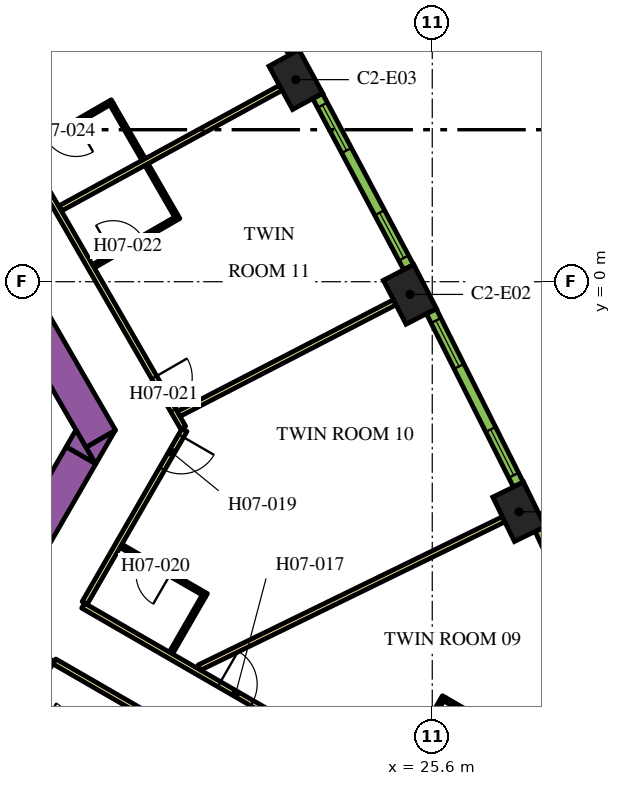
"""IFC4 building model, lengths in metres.
Left out: names, types, materials, properties, quantities, classifications, styles, units other than length and angle.
Written with IfcOpenShell. Run it as: python <this file> out.ifc"""

import sys

from ifc_helpers import new_model, si_unit, direction, frame, frame_2d, origin, origin_2d, place, context, subcontext, project, spatial, polyline, rectangle, outline, extrude, element, fill, save


model = new_model("IFC4")
c1 = context("Model", 3, precision=1e-05, world=origin(), true_north=direction((0.0, 1.0)))
c2 = subcontext(c1, "Body", "Model", "MODEL_VIEW")
j1 = project(units=[si_unit("LENGTHUNIT", "METRE"), si_unit("PLANEANGLEUNIT", "RADIAN")], contexts=[c1])
p1 = place(None, origin())
s1 = spatial("IfcSite", under=j1, at=p1, CompositionType="ELEMENT")
p2 = place(p1, origin())
s2 = spatial("IfcBuilding", under=s1, at=p2, CompositionType="ELEMENT")
p3 = place(p2, frame((0.0, 0.0, 95.4)))
s3 = spatial("IfcBuildingStorey", under=s2, at=p3, CompositionType="ELEMENT", Elevation=95.4)
for number, where, z_axis, x_axis in (
    (1, (27.883, -6.054, 0.0), (0.0, 0.0, 1.0), (-0.438, 0.899, 0.0)),
    (2, (25.012, -0.334, 0.0), (0.0, 0.0, 1.0), (-0.459, 0.888, 0.0)),
    (3, (22.009, 5.317, 0.0), (0.0, 0.0, 1.0), (-0.48, 0.877, 0.0)),
):
    element("IfcColumn", number, at=place(p3, frame(where, z_axis=z_axis, x_axis=x_axis)), inside=s3, PredefinedType="COLUMN", context=c2, shape_type="SweptSolid", body=[
        extrude(rectangle(XDim=1.3, YDim=0.9, at=origin_2d()), origin(), (0.0, 0.0, 1.0), 3.9),
    ])
p4 = place(p3, frame((6.776, 13.364, 0.0), z_axis=(0.0, 0.0, 1.0), x_axis=(0.500004177138, -0.8660229921, 0.0)))
e4 = element("IfcWall", 4, at=p4, inside=s3, PredefinedType="SOLIDWALL", context=c2, shape_type="SweptSolid", body=[
    extrude(rectangle(XDim=20.204, YDim=0.9, at=frame_2d((10.102, 0.0))), origin(), (0.0, 0.0, 1.0), 3.9),
])
p5 = place(p3, origin())
e5 = element("IfcWall", 5, at=p5, inside=s3, PredefinedType="SOLIDWALL", context=c2, shape_type="SweptSolid", body=[
    extrude(outline(polyline([(16.743, -4.8), (16.489, -4.36), (17.251, -3.92), (16.743, -4.8)])), origin(), (0.0, 0.0, 1.0), 3.9),
])
p6 = place(p3, frame((11.695, -12.644, 0.0), z_axis=(0.0, 0.0, 1.0), x_axis=(0.500010229568, 0.86601949766, 0.0)))
e6 = element("IfcWall", 6, at=p6, inside=s3, PredefinedType="SOLIDWALL", context=c2, shape_type="SweptSolid", body=[
    extrude(rectangle(XDim=9.326, YDim=0.9, at=frame_2d((4.663, 0.0))), origin(), (0.0, 0.0, 1.0), 3.9),
])
e7 = element("IfcWall", 7, at=p5, inside=s3, PredefinedType="SOLIDWALL", context=c2, shape_type="SweptSolid", body=[
    extrude(outline(polyline([(16.223, -3.9), (16.732, -4.78), (15.969, -4.34), (16.223, -3.9)])), origin(), (0.0, 0.0, 1.0), 3.9),
])
p7 = place(p3, frame((16.412, -8.523, 0.0), z_axis=(0.0, 0.0, 1.0), x_axis=(0.866025629663, -0.499999608766, 0.0)))
e8 = element("IfcWall", 8, at=p7, inside=s3, PredefinedType="PARTITIONING", context=c2, shape_type="SweptSolid", body=[
    extrude(rectangle(XDim=13.624, YDim=0.15, at=frame_2d((6.812, 0.0))), origin(), (0.0, 0.0, 1.0), 2.75),
])
p8 = place(p7, frame((4.134, 0.0, 0.0)))
e9 = element("IfcOpeningElement", 9, at=p8, cuts=e8, PredefinedType="OPENING", context=c2, shape_type="SweptSolid", body=[
    extrude(rectangle(XDim=1.0, YDim=2.1, at=frame_2d((0.5, 1.05))), frame((0.0, 0.085, 0.0), z_axis=(0.0, -1.0, 0.0), x_axis=(1.0, 0.0, 0.0)), (0.0, 0.0, 1.0), 0.17),
])
p9 = place(p3, frame((19.081, -3.9, 0.0), z_axis=(0.0, 0.0, 1.0), x_axis=(-0.499974327079, -0.866040225545, 0.0)))
e10 = element("IfcWall", 10, at=p9, inside=s3, PredefinedType="PARTITIONING", context=c2, shape_type="SweptSolid", body=[
    extrude(rectangle(XDim=5.258, YDim=0.15, at=frame_2d((2.629, 0.0))), origin(), (0.0, 0.0, 1.0), 2.75),
])
p10 = place(p9, frame((0.18, 0.0, 0.0)))
e11 = element("IfcOpeningElement", 11, at=p10, cuts=e10, PredefinedType="OPENING", context=c2, shape_type="SweptSolid", body=[
    extrude(rectangle(XDim=1.0, YDim=2.1, at=frame_2d((0.5, 1.05))), frame((0.0, 0.085, 0.0), z_axis=(0.0, -1.0, 0.0), x_axis=(1.0, 0.0, 0.0)), (0.0, 0.0, 1.0), 0.17),
])
p11 = place(p3, frame((6.163, 18.475, 0.0), z_axis=(0.0, 0.0, 1.0), x_axis=(0.500001317485, -0.866024643133, 0.0)))
e12 = element("IfcWall", 12, at=p11, inside=s3, PredefinedType="PARTITIONING", context=c2, shape_type="SweptSolid", body=[
    extrude(rectangle(XDim=25.767, YDim=0.15, at=frame_2d((12.883, 0.0))), origin(), (0.0, 0.0, 1.0), 2.75),
])
p12 = place(p11, frame((24.241, 0.0, 0.0)))
e13 = element("IfcOpeningElement", 13, at=p12, cuts=e12, PredefinedType="OPENING", context=c2, shape_type="SweptSolid", body=[
    extrude(rectangle(XDim=1.0, YDim=2.1, at=frame_2d((0.5, 1.05))), frame((0.0, 0.085, 0.0), z_axis=(0.0, -1.0, 0.0), x_axis=(1.0, 0.0, 0.0)), (0.0, 0.0, 1.0), 0.17),
])
p13 = place(p11, frame((13.144, 0.0, 0.0)))
e14 = element("IfcOpeningElement", 14, at=p13, cuts=e12, PredefinedType="OPENING", context=c2, shape_type="SweptSolid", body=[
    extrude(rectangle(XDim=1.0, YDim=2.1, at=frame_2d((0.5, 1.05))), frame((0.0, 0.085, 0.0), z_axis=(0.0, -1.0, 0.0), x_axis=(1.0, 0.0, 0.0)), (0.0, 0.0, 1.0), 0.17),
])
p14 = place(p11, frame((11.592, 0.0, 0.0)))
e15 = element("IfcOpeningElement", 15, at=p14, cuts=e12, PredefinedType="OPENING", context=c2, shape_type="SweptSolid", body=[
    extrude(rectangle(XDim=1.1, YDim=2.1, at=frame_2d((0.55, 1.05))), frame((0.0, 0.085, 0.0), z_axis=(0.0, -1.0, 0.0), x_axis=(1.0, 0.0, 0.0)), (0.0, 0.0, 1.0), 0.17),
])
p15 = place(p11, frame((4.674, 0.0, 0.0)))
e16 = element("IfcOpeningElement", 16, at=p15, cuts=e12, PredefinedType="OPENING", context=c2, shape_type="SweptSolid", body=[
    extrude(rectangle(XDim=0.9, YDim=2.1, at=frame_2d((0.45, 1.05))), frame((0.0, 0.085, 0.0), z_axis=(0.0, -1.0, 0.0), x_axis=(1.0, 0.0, 0.0)), (0.0, 0.0, 1.0), 0.17),
])
p16 = place(p11, frame((2.411, 0.0, 0.0)))
e17 = element("IfcOpeningElement", 17, at=p16, cuts=e12, PredefinedType="OPENING", context=c2, shape_type="SweptSolid", body=[
    extrude(rectangle(XDim=1.0, YDim=2.1, at=frame_2d((0.5, 1.05))), frame((0.0, 0.085, 0.0), z_axis=(0.0, -1.0, 0.0), x_axis=(1.0, 0.0, 0.0)), (0.0, 0.0, 1.0), 0.17),
])
p17 = place(p3, frame((15.587, -9.952, 0.0), z_axis=(0.0, 0.0, 1.0), x_axis=(-0.500016618951, -0.866015808616, 0.0)))
e18 = element("IfcWall", 18, at=p17, inside=s3, PredefinedType="PARTITIONING", context=c2, shape_type="SweptSolid", body=[
    extrude(rectangle(XDim=5.268, YDim=0.15, at=frame_2d((2.634, 0.0))), origin(), (0.0, 0.0, 1.0), 2.75),
])
p18 = place(p17, frame((4.088, 0.0, 0.0)))
e19 = element("IfcOpeningElement", 19, at=p18, cuts=e18, PredefinedType="OPENING", context=c2, shape_type="SweptSolid", body=[
    extrude(rectangle(XDim=1.0, YDim=2.1, at=frame_2d((0.5, 1.05))), frame((0.0, 0.085, 0.0), z_axis=(0.0, -1.0, 0.0), x_axis=(1.0, 0.0, 0.0)), (0.0, 0.0, 1.0), 0.17),
])
p19 = place(p3, frame((27.386, -16.764, 0.0), z_axis=(0.0, 0.0, 1.0), x_axis=(-0.866022585856, 0.500004880763, 0.0)))
e20 = element("IfcWall", 20, at=p19, inside=s3, PredefinedType="PARTITIONING", context=c2, shape_type="SweptSolid", body=[
    extrude(rectangle(XDim=13.544, YDim=0.15, at=frame_2d((6.772, 0.0))), origin(), (0.0, 0.0, 1.0), 2.75),
])
p20 = place(p19, frame((8.491, 0.0, 0.0)))
e21 = element("IfcOpeningElement", 21, at=p20, cuts=e20, PredefinedType="OPENING", context=c2, shape_type="SweptSolid", body=[
    extrude(rectangle(XDim=1.0, YDim=2.1, at=frame_2d((0.5, 1.05))), frame((0.0, 0.085, 0.0), z_axis=(0.0, -1.0, 0.0), x_axis=(1.0, 0.0, 0.0)), (0.0, 0.0, 1.0), 0.17),
])
p21 = place(p3, frame((21.614, 5.102, 0.0), z_axis=(0.0, 0.0, 1.0), x_axis=(-0.877484555087, -0.479604895287, 0.0)))
e22 = element("IfcWall", 22, at=p21, inside=s3, PredefinedType="PARTITIONING", context=c2, shape_type="SweptSolid", body=[
    extrude(rectangle(XDim=6.611, YDim=0.15, at=frame_2d((3.306, 0.0))), origin(), (0.0, 0.0, 1.0), 2.75),
])
p22 = place(p3, frame((24.613, -0.541, 0.0), z_axis=(0.0, 0.0, 1.0), x_axis=(-0.888459912519, -0.458954228487, 0.0)))
e23 = element("IfcWall", 23, at=p22, inside=s3, PredefinedType="PARTITIONING", context=c2, shape_type="SweptSolid", body=[
    extrude(rectangle(XDim=6.392, YDim=0.15, at=frame_2d((3.196, 0.0))), origin(), (0.0, 0.0, 1.0), 2.75),
])
p23 = place(p3, frame((27.479, -6.251, 0.0), z_axis=(0.0, 0.0, 1.0), x_axis=(-0.898945877276, -0.438059710231, 0.0)))
e24 = element("IfcWall", 24, at=p23, inside=s3, PredefinedType="PARTITIONING", context=c2, shape_type="SweptSolid", body=[
    extrude(rectangle(XDim=8.909, YDim=0.15, at=frame_2d((4.455, 0.0))), origin(), (0.0, 0.0, 1.0), 2.75),
])
p24 = place(p3, frame((25.91, -10.918, 0.0), z_axis=(0.0, 0.0, 1.0), x_axis=(-0.500006934395, -0.866021400173, 0.0)))
e25 = element("IfcWall", 25, at=p24, inside=s3, PredefinedType="PARTITIONING", context=c2, shape_type="SweptSolid", body=[
    extrude(rectangle(XDim=2.6, YDim=0.1, at=frame_2d((1.3, 0.0))), origin(), (0.0, 0.0, 1.0), 2.75),
])
p25 = place(p24, frame((1.1, 0.0, 0.0)))
e26 = element("IfcOpeningElement", 26, at=p25, cuts=e25, PredefinedType="OPENING", context=c2, shape_type="SweptSolid", body=[
    extrude(rectangle(XDim=0.9, YDim=2.1, at=frame_2d((0.45, 1.05))), frame((0.0, 0.06, 0.0), z_axis=(0.0, -1.0, 0.0), x_axis=(1.0, 0.0, 0.0)), (0.0, 0.0, 1.0), 0.12),
])
p26 = place(p3, frame((25.928, -10.986, 0.0), z_axis=(0.0, 0.0, 1.0), x_axis=(0.866025371046, -0.500000056704, 0.0)))
e27 = element("IfcWall", 27, at=p26, inside=s3, PredefinedType="PARTITIONING", context=c2, shape_type="SweptSolid", body=[
    extrude(rectangle(XDim=1.7, YDim=0.1, at=frame_2d((0.85, 0.0))), origin(), (0.0, 0.0, 1.0), 2.75),
])
p27 = place(p3, frame((19.659, -8.25, 0.0), z_axis=(0.0, 0.0, 1.0), x_axis=(-0.866021400173, 0.500006934395, 0.0)))
e28 = element("IfcWall", 28, at=p27, inside=s3, PredefinedType="PARTITIONING", context=c2, shape_type="SweptSolid", body=[
    extrude(rectangle(XDim=2.6, YDim=0.1, at=frame_2d((1.3, 0.0))), origin(), (0.0, 0.0, 1.0), 2.75),
])
p28 = place(p27, frame((1.1, 0.0, 0.0)))
e29 = element("IfcOpeningElement", 29, at=p28, cuts=e28, PredefinedType="OPENING", context=c2, shape_type="SweptSolid", body=[
    extrude(rectangle(XDim=0.9, YDim=2.1, at=frame_2d((0.45, 1.05))), frame((0.0, 0.06, 0.0), z_axis=(0.0, -1.0, 0.0), x_axis=(1.0, 0.0, 0.0)), (0.0, 0.0, 1.0), 0.12),
])
p29 = place(p3, frame((19.591, -8.268, 0.0), z_axis=(0.0, 0.0, 1.0), x_axis=(-0.500040090343, -0.866002256377, 0.0)))
e30 = element("IfcWall", 30, at=p29, inside=s3, PredefinedType="PARTITIONING", context=c2, shape_type="SweptSolid", body=[
    extrude(rectangle(XDim=1.73, YDim=0.1, at=frame_2d((0.865, 0.0))), origin(), (0.0, 0.0, 1.0), 2.75),
])
p30 = place(p3, frame((16.681, 0.407, 0.0), z_axis=(0.0, 0.0, 1.0), x_axis=(0.866021400173, 0.500006934395, 0.0)))
e31 = element("IfcWall", 31, at=p30, inside=s3, PredefinedType="PARTITIONING", context=c2, shape_type="SweptSolid", body=[
    extrude(rectangle(XDim=2.6, YDim=0.1, at=frame_2d((1.3, 0.0))), origin(), (0.0, 0.0, 1.0), 2.75),
])
p31 = place(p30, frame((0.6, 0.0, 0.0)))
e32 = element("IfcOpeningElement", 32, at=p31, cuts=e31, PredefinedType="OPENING", context=c2, shape_type="SweptSolid", body=[
    extrude(rectangle(XDim=0.9, YDim=2.1, at=frame_2d((0.45, 1.05))), frame((0.0, 0.06, 0.0), z_axis=(0.0, -1.0, 0.0), x_axis=(1.0, 0.0, 0.0)), (0.0, 0.0, 1.0), 0.12),
])
p32 = place(p3, frame((18.86, 1.734, 0.0), z_axis=(0.0, 0.0, 1.0), x_axis=(-0.500017819788, 0.86601511528, 0.0)))
e33 = element("IfcWall", 33, at=p32, inside=s3, PredefinedType="PARTITIONING", context=c2, shape_type="SweptSolid", body=[
    extrude(rectangle(XDim=1.55, YDim=0.1, at=frame_2d((0.775, 0.0))), origin(), (0.0, 0.0, 1.0), 2.75),
])
p33 = place(p3, frame((17.179, 4.745, 0.0), z_axis=(0.0, 0.0, 1.0), x_axis=(-0.866021400173, -0.500006934395, 0.0)))
e34 = element("IfcWall", 34, at=p33, inside=s3, PredefinedType="PARTITIONING", context=c2, shape_type="SweptSolid", body=[
    extrude(rectangle(XDim=2.6, YDim=0.1, at=frame_2d((1.3, 0.0))), origin(), (0.0, 0.0, 1.0), 2.75),
])
p34 = place(p33, frame((1.1, 0.0, 0.0)))
e35 = element("IfcOpeningElement", 35, at=p34, cuts=e34, PredefinedType="OPENING", context=c2, shape_type="SweptSolid", body=[
    extrude(rectangle(XDim=0.9, YDim=2.1, at=frame_2d((0.45, 1.05))), frame((0.0, 0.06, 0.0), z_axis=(0.0, -1.0, 0.0), x_axis=(1.0, 0.0, 0.0)), (0.0, 0.0, 1.0), 0.12),
])
p35 = place(p3, frame((17.161, 4.677, 0.0), z_axis=(0.0, 0.0, 1.0), x_axis=(0.499890179513, -0.866088799389, 0.0)))
e36 = element("IfcWall", 36, at=p35, inside=s3, PredefinedType="PARTITIONING", context=c2, shape_type="SweptSolid", body=[
    extrude(rectangle(XDim=1.68, YDim=0.1, at=frame_2d((0.84, 0.0))), origin(), (0.0, 0.0, 1.0), 2.75),
])
p36 = place(p3, frame((30.62, -11.127, 0.0), z_axis=(0.0, 0.0, 1.0), x_axis=(-0.427543726596, 0.903994669148, 0.0)))
e37 = element("IfcWall", 37, at=p36, inside=s3, PredefinedType="SOLIDWALL", context=c2, shape_type="SweptSolid", body=[
    extrude(rectangle(XDim=5.107, YDim=0.29, at=frame_2d((2.553, 0.0))), origin(), (0.0, 0.0, 1.0), 3.65),
])
p37 = place(p36, frame((0.24, 0.0, 0.9)))
e38 = element("IfcOpeningElement", 38, at=p37, cuts=e37, PredefinedType="OPENING", context=c2, shape_type="SweptSolid", body=[
    extrude(rectangle(XDim=1.35, YDim=2.15, at=frame_2d((0.675, 1.075))), frame((0.0, 0.155, 0.0), z_axis=(0.0, -1.0, 0.0), x_axis=(1.0, 0.0, 0.0)), (0.0, 0.0, 1.0), 0.31),
])
p38 = place(p36, frame((3.471, 0.0, 0.9)))
e39 = element("IfcOpeningElement", 39, at=p38, cuts=e37, PredefinedType="OPENING", context=c2, shape_type="SweptSolid", body=[
    extrude(rectangle(XDim=1.35, YDim=2.15, at=frame_2d((0.675, 1.075))), frame((0.0, 0.155, 0.0), z_axis=(0.0, -1.0, 0.0), x_axis=(1.0, 0.0, 0.0)), (0.0, 0.0, 1.0), 0.31),
])
p39 = place(p3, frame((27.864, -5.336, 0.0), z_axis=(0.0, 0.0, 1.0), x_axis=(-0.448534297211, 0.893765620409, 0.0)))
e40 = element("IfcWall", 40, at=p39, inside=s3, PredefinedType="SOLIDWALL", context=c2, shape_type="SweptSolid", body=[
    extrude(rectangle(XDim=5.1, YDim=0.29, at=frame_2d((2.55, 0.0))), origin(), (0.0, 0.0, 1.0), 3.65),
])
p40 = place(p39, frame((0.272, 0.0, 0.9)))
e41 = element("IfcOpeningElement", 41, at=p40, cuts=e40, PredefinedType="OPENING", context=c2, shape_type="SweptSolid", body=[
    extrude(rectangle(XDim=1.35, YDim=2.15, at=frame_2d((0.675, 1.075))), frame((0.0, 0.155, 0.0), z_axis=(0.0, -1.0, 0.0), x_axis=(1.0, 0.0, 0.0)), (0.0, 0.0, 1.0), 0.31),
])
p41 = place(p39, frame((3.478, 0.0, 0.9)))
e42 = element("IfcOpeningElement", 42, at=p41, cuts=e40, PredefinedType="OPENING", context=c2, shape_type="SweptSolid", body=[
    extrude(rectangle(XDim=1.35, YDim=2.15, at=frame_2d((0.675, 1.075))), frame((0.0, 0.155, 0.0), z_axis=(0.0, -1.0, 0.0), x_axis=(1.0, 0.0, 0.0)), (0.0, 0.0, 1.0), 0.31),
])
p42 = place(p3, frame((24.977, 0.383, 0.0), z_axis=(0.0, 0.0, 1.0), x_axis=(-0.469323203119, 0.883026461106, 0.0)))
e43 = element("IfcWall", 43, at=p42, inside=s3, PredefinedType="SOLIDWALL", context=c2, shape_type="SweptSolid", body=[
    extrude(rectangle(XDim=5.101, YDim=0.29, at=frame_2d((2.55, 0.0))), origin(), (0.0, 0.0, 1.0), 3.65),
])
p43 = place(p42, frame((0.273, 0.0, 0.9)))
e44 = element("IfcOpeningElement", 44, at=p43, cuts=e43, PredefinedType="OPENING", context=c2, shape_type="SweptSolid", body=[
    extrude(rectangle(XDim=1.35, YDim=2.15, at=frame_2d((0.675, 1.075))), frame((0.0, 0.155, 0.0), z_axis=(0.0, -1.0, 0.0), x_axis=(1.0, 0.0, 0.0)), (0.0, 0.0, 1.0), 0.31),
])
p44 = place(p42, frame((3.478, 0.0, 0.9)))
e45 = element("IfcOpeningElement", 45, at=p44, cuts=e43, PredefinedType="OPENING", context=c2, shape_type="SweptSolid", body=[
    extrude(rectangle(XDim=1.35, YDim=2.15, at=frame_2d((0.675, 1.075))), frame((0.0, 0.155, 0.0), z_axis=(0.0, -1.0, 0.0), x_axis=(1.0, 0.0, 0.0)), (0.0, 0.0, 1.0), 0.31),
])
p45 = place(p3, frame((21.956, 6.033, 0.0), z_axis=(0.0, 0.0, 1.0), x_axis=(-0.48983164787, 0.87181704316, 0.0)))
e46 = element("IfcWall", 46, at=p45, inside=s3, PredefinedType="SOLIDWALL", context=c2, shape_type="SweptSolid", body=[
    extrude(rectangle(XDim=5.1, YDim=0.29, at=frame_2d((2.55, 0.0))), origin(), (0.0, 0.0, 1.0), 3.65),
])
p46 = place(p45, frame((0.273, 0.0, 0.9)))
e47 = element("IfcOpeningElement", 47, at=p46, cuts=e46, PredefinedType="OPENING", context=c2, shape_type="SweptSolid", body=[
    extrude(rectangle(XDim=1.35, YDim=2.15, at=frame_2d((0.675, 1.075))), frame((0.0, 0.155, 0.0), z_axis=(0.0, -1.0, 0.0), x_axis=(1.0, 0.0, 0.0)), (0.0, 0.0, 1.0), 0.31),
])
p47 = place(p45, frame((3.478, 0.0, 0.9)))
e48 = element("IfcOpeningElement", 48, at=p47, cuts=e46, PredefinedType="OPENING", context=c2, shape_type="SweptSolid", body=[
    extrude(rectangle(XDim=1.35, YDim=2.15, at=frame_2d((0.675, 1.075))), frame((0.0, 0.155, 0.0), z_axis=(0.0, -1.0, 0.0), x_axis=(1.0, 0.0, 0.0)), (0.0, 0.0, 1.0), 0.31),
])
p48 = place(p8, origin())
e49 = element("IfcDoor", 49, at=p48, inside=s3, OperationType="SINGLE_SWING_LEFT", PredefinedType="DOOR", context=c2, shape_type="SweptSolid", body=[
    extrude(rectangle(XDim=1.0, YDim=2.1, at=frame_2d((0.5, 1.05))), frame((0.0, 0.025, 0.0), z_axis=(0.0, -1.0, 0.0), x_axis=(1.0, 0.0, 0.0)), (0.0, 0.0, 1.0), 0.05),
])
fill(e9, e49)
p49 = place(p10, origin())
e50 = element("IfcDoor", 50, at=p49, inside=s3, OperationType="SINGLE_SWING_LEFT", PredefinedType="DOOR", context=c2, shape_type="SweptSolid", body=[
    extrude(rectangle(XDim=1.0, YDim=2.1, at=frame_2d((0.5, 1.05))), frame((0.0, 0.025, 0.0), z_axis=(0.0, -1.0, 0.0), x_axis=(1.0, 0.0, 0.0)), (0.0, 0.0, 1.0), 0.05),
])
fill(e11, e50)
p50 = place(p28, origin())
e51 = element("IfcDoor", 51, at=p50, inside=s3, OperationType="SINGLE_SWING_LEFT", PredefinedType="DOOR", context=c2, shape_type="SweptSolid", body=[
    extrude(rectangle(XDim=0.9, YDim=2.1, at=frame_2d((0.45, 1.05))), frame((0.0, 0.025, 0.0), z_axis=(0.0, -1.0, 0.0), x_axis=(1.0, 0.0, 0.0)), (0.0, 0.0, 1.0), 0.05),
])
fill(e29, e51)
p51 = place(p12, origin())
e52 = element("IfcDoor", 52, at=p51, inside=s3, OperationType="SINGLE_SWING_RIGHT", PredefinedType="DOOR", context=c2, shape_type="SweptSolid", body=[
    extrude(rectangle(XDim=1.0, YDim=2.1, at=frame_2d((0.5, 1.05))), frame((0.0, 0.025, 0.0), z_axis=(0.0, -1.0, 0.0), x_axis=(1.0, 0.0, 0.0)), (0.0, 0.0, 1.0), 0.05),
])
fill(e13, e52)
p52 = place(p31, origin())
e53 = element("IfcDoor", 53, at=p52, inside=s3, OperationType="SINGLE_SWING_LEFT", PredefinedType="DOOR", context=c2, shape_type="SweptSolid", body=[
    extrude(rectangle(XDim=0.9, YDim=2.1, at=frame_2d((0.45, 1.05))), frame((0.0, 0.025, 0.0), z_axis=(0.0, -1.0, 0.0), x_axis=(1.0, 0.0, 0.0)), (0.0, 0.0, 1.0), 0.05),
])
fill(e32, e53)
p53 = place(p34, origin())
e54 = element("IfcDoor", 54, at=p53, inside=s3, OperationType="SINGLE_SWING_RIGHT", PredefinedType="DOOR", context=c2, shape_type="SweptSolid", body=[
    extrude(rectangle(XDim=0.9, YDim=2.1, at=frame_2d((0.45, 1.05))), frame((0.0, 0.025, 0.0), z_axis=(0.0, -1.0, 0.0), x_axis=(1.0, 0.0, 0.0)), (0.0, 0.0, 1.0), 0.05),
])
fill(e35, e54)
p54 = place(p40, origin())
e55 = element("IfcWindow", 55, at=p54, inside=s3, PartitioningType="DOUBLE_PANEL_VERTICAL", PredefinedType="WINDOW", context=c2, shape_type="SweptSolid", body=[
    extrude(rectangle(XDim=1.35, YDim=2.15, at=frame_2d((0.675, 1.075))), frame((0.0, 0.015, 0.0), z_axis=(0.0, -1.0, 0.0), x_axis=(1.0, 0.0, 0.0)), (0.0, 0.0, 1.0), 0.06),
])
fill(e41, e55)
p55 = place(p41, origin())
e56 = element("IfcWindow", 56, at=p55, inside=s3, PartitioningType="DOUBLE_PANEL_VERTICAL", PredefinedType="WINDOW", context=c2, shape_type="SweptSolid", body=[
    extrude(rectangle(XDim=1.35, YDim=2.15, at=frame_2d((0.675, 1.075))), frame((0.0, 0.015, 0.0), z_axis=(0.0, -1.0, 0.0), x_axis=(1.0, 0.0, 0.0)), (0.0, 0.0, 1.0), 0.06),
])
fill(e42, e56)
p56 = place(p43, origin())
e57 = element("IfcWindow", 57, at=p56, inside=s3, PartitioningType="DOUBLE_PANEL_VERTICAL", PredefinedType="WINDOW", context=c2, shape_type="SweptSolid", body=[
    extrude(rectangle(XDim=1.35, YDim=2.15, at=frame_2d((0.675, 1.075))), frame((0.0, 0.015, 0.0), z_axis=(0.0, -1.0, 0.0), x_axis=(1.0, 0.0, 0.0)), (0.0, 0.0, 1.0), 0.06),
])
fill(e44, e57)
p57 = place(p44, origin())
e58 = element("IfcWindow", 58, at=p57, inside=s3, PartitioningType="DOUBLE_PANEL_VERTICAL", PredefinedType="WINDOW", context=c2, shape_type="SweptSolid", body=[
    extrude(rectangle(XDim=1.35, YDim=2.15, at=frame_2d((0.675, 1.075))), frame((0.0, 0.015, 0.0), z_axis=(0.0, -1.0, 0.0), x_axis=(1.0, 0.0, 0.0)), (0.0, 0.0, 1.0), 0.06),
])
fill(e45, e58)
save(model, sys.argv[1])
